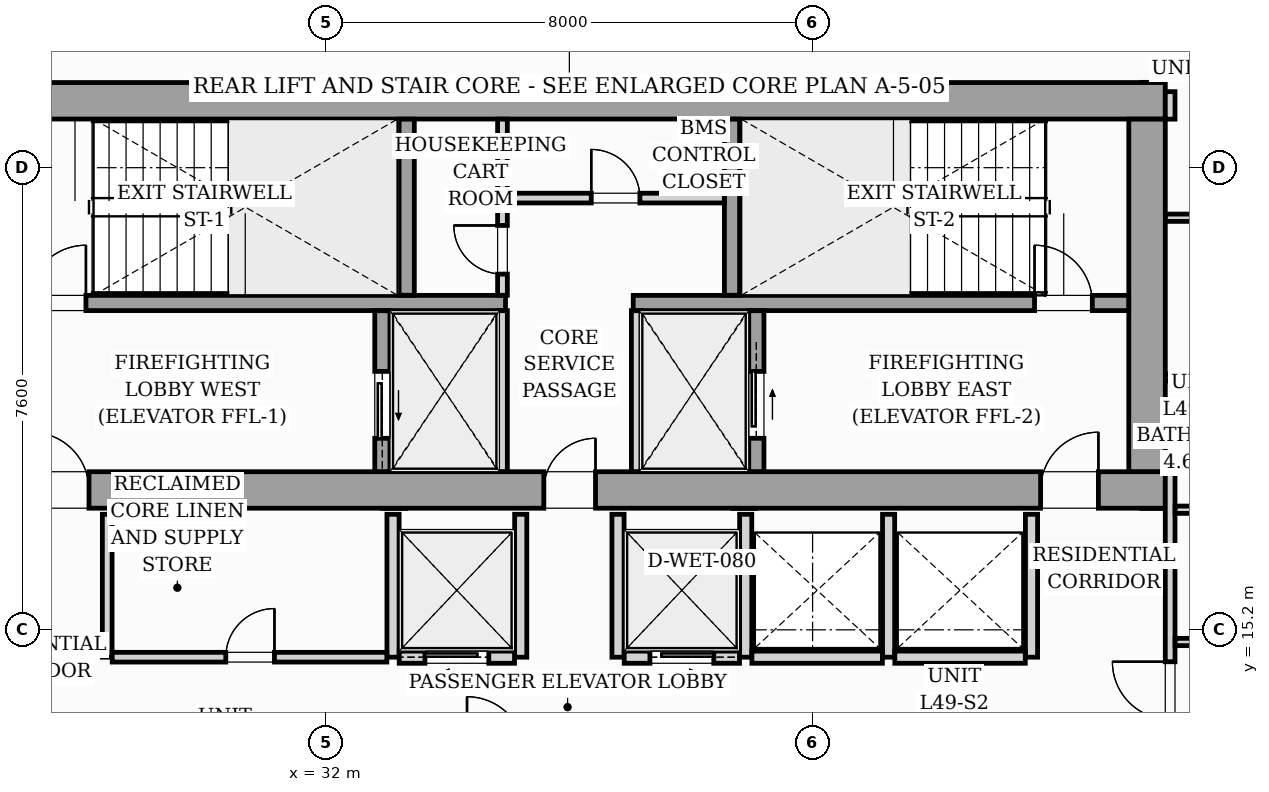
"""IFC4 building model, lengths in metres.
Left out: names, types, materials, properties, quantities, classifications, styles, units other than length and angle.
Written with IfcOpenShell. Run it as: python <this file> out.ifc"""

import sys

from ifc_helpers import new_model, si_unit, direction, frame, frame_2d, origin, origin_2d, place, context, subcontext, project, spatial, rectangle, i_section, extrude, source, transform, mapped, element, fill, save


model = new_model("IFC4")
c1 = context("Model", 3, precision=1e-05, world=origin(), true_north=direction((0.0, 1.0)))
c2 = subcontext(c1, "Body", "Model", "MODEL_VIEW")
j1 = project(units=[si_unit("LENGTHUNIT", "METRE"), si_unit("PLANEANGLEUNIT", "RADIAN")], contexts=[c1])
p1 = place(None, origin())
s1 = spatial("IfcSite", under=j1, at=p1, CompositionType="ELEMENT")
p2 = place(p1, origin())
s2 = spatial("IfcBuilding", under=s1, at=p2, CompositionType="ELEMENT")
p3 = place(p2, frame((0.0, 0.0, 173.0)))
s3 = spatial("IfcBuildingStorey", under=s2, at=p3, CompositionType="ELEMENT", Elevation=173.0)
m1 = source(origin(), c2, "Body", "SweptSolid", [
    extrude(i_section(OverallWidth=0.416, OverallDepth=0.446, WebThickness=0.039, FlangeThickness=0.063, FilletRadius=0.018, at=origin_2d()), origin(), (0.0, 0.0, 1.0), 3.196),
])
for number, where, z_axis, x_axis in (
    (1, (33.12, 17.4, 0.002), (0.0, 0.0, 1.0), (1.0, 0.0, 0.0)),
    (2, (38.88, 17.4, 0.002), (0.0, 0.0, 1.0), (1.0, 0.0, 0.0)),
    (3, (45.6, 17.4, 0.002), (0.0, 0.0, 1.0), (1.0, 0.0, 0.0)),
    (4, (33.12, 24.0, 0.002), (0.0, 0.0, 1.0), (1.0, 0.0, 0.0)),
    (5, (38.88, 24.0, 0.002), (0.0, 0.0, 1.0), (1.0, 0.0, 0.0)),
    (6, (45.6, 24.0, 0.002), (0.0, 0.0, 1.0), (1.0, 0.0, 0.0)),
):
    element("IfcColumn", number, at=place(p3, frame(where, z_axis=z_axis, x_axis=x_axis)), inside=s3, PredefinedType="PILASTER", context=c2, shape_type="MappedRepresentation", body=[
        mapped(m1, transform((0.0, 0.0, 0.0), scale=1.0)),
    ])
p4 = place(p3, frame((15.437, 24.324, 0.0), z_axis=(0.0, 0.0, 1.0), x_axis=(0.995395627913, 0.095851676732, 0.0)))
e7 = element("IfcWall", 7, at=p4, inside=s3, PredefinedType="STANDARD", context=c2, shape_type="SweptSolid", body=[
    extrude(rectangle(XDim=16.1, YDim=0.26, at=frame_2d((8.05, 0.0))), origin(), (0.0, 0.0, 1.0), 2.94),
])
p5 = place(p4, frame((7.492, 0.0, 0.0)))
e8 = element("IfcOpeningElement", 8, at=p5, cuts=e7, PredefinedType="OPENING", context=c2, shape_type="SweptSolid", body=[
    extrude(rectangle(XDim=1.8, YDim=2.06, at=frame_2d((0.9, 1.03))), frame((0.0, 0.14, 0.0), z_axis=(0.0, -1.0, 0.0), x_axis=(1.0, 0.0, 0.0)), (0.0, 0.0, 1.0), 0.28),
])
p6 = place(p4, frame((2.05, 0.0, 0.65)))
e9 = element("IfcOpeningElement", 9, at=p6, cuts=e7, PredefinedType="OPENING", context=c2, shape_type="SweptSolid", body=[
    extrude(rectangle(XDim=1.6, YDim=1.5, at=frame_2d((0.8, 0.75))), frame((0.0, 0.14, 0.0), z_axis=(0.0, -1.0, 0.0), x_axis=(1.0, 0.0, 0.0)), (0.0, 0.0, 1.0), 0.28),
])
p7 = place(p3, frame((26.2, 17.5, 0.0), z_axis=(0.0, 0.0, 1.0), x_axis=(1.0, 0.0, 0.0)))
e10 = element("IfcWall", 10, at=p7, inside=s3, PredefinedType="SHEAR", context=c2, shape_type="SweptSolid", body=[
    extrude(rectangle(XDim=19.6, YDim=0.6, at=frame_2d((9.8, 0.0))), origin(), (0.0, 0.0, 1.0), 3.2),
])
p8 = place(p7, frame((0.95, 0.0, 0.0)))
e11 = element("IfcOpeningElement", 11, at=p8, cuts=e10, PredefinedType="OPENING", context=c2, shape_type="SweptSolid", body=[
    extrude(rectangle(XDim=0.95, YDim=2.06, at=frame_2d((0.475, 1.03))), frame((0.0, 0.31, 0.0), z_axis=(0.0, -1.0, 0.0), x_axis=(1.0, 0.0, 0.0)), (0.0, 0.0, 1.0), 0.62),
])
p9 = place(p7, frame((9.38, 0.0, 0.0)))
e12 = element("IfcOpeningElement", 12, at=p9, cuts=e10, PredefinedType="OPENING", context=c2, shape_type="SweptSolid", body=[
    extrude(rectangle(XDim=0.85, YDim=2.0, at=frame_2d((0.425, 1.0))), frame((0.0, 0.31, 0.0), z_axis=(0.0, -1.0, 0.0), x_axis=(1.0, 0.0, 0.0)), (0.0, 0.0, 1.0), 0.62),
])
p10 = place(p7, frame((17.55, 0.0, 0.0)))
e13 = element("IfcOpeningElement", 13, at=p10, cuts=e10, PredefinedType="OPENING", context=c2, shape_type="SweptSolid", body=[
    extrude(rectangle(XDim=0.95, YDim=2.06, at=frame_2d((0.475, 1.03))), frame((0.0, 0.31, 0.0), z_axis=(0.0, -1.0, 0.0), x_axis=(1.0, 0.0, 0.0)), (0.0, 0.0, 1.0), 0.62),
])
p11 = place(p3, frame((26.2, 23.9, 0.0), z_axis=(0.0, 0.0, 1.0), x_axis=(1.0, 0.0, 0.0)))
e14 = element("IfcWall", 14, at=p11, inside=s3, PredefinedType="SHEAR", context=c2, shape_type="SweptSolid", body=[
    extrude(rectangle(XDim=19.6, YDim=0.6, at=frame_2d((9.8, 0.0))), origin(), (0.0, 0.0, 1.0), 3.2),
])
p12 = place(p3, frame((45.5, 17.802, 0.0), z_axis=(0.0, 0.0, 1.0), x_axis=(0.0, 1.0, 0.0)))
e15 = element("IfcWall", 15, at=p12, inside=s3, PredefinedType="SHEAR", context=c2, shape_type="SweptSolid", body=[
    extrude(rectangle(XDim=5.796, YDim=0.6, at=frame_2d((2.898, 0.0))), origin(), (0.0, 0.0, 1.0), 3.2),
])
p13 = place(p3, frame((26.802, 20.575, 0.0), z_axis=(0.0, 0.0, 1.0), x_axis=(1.0, 0.0, 0.0)))
e16 = element("IfcWall", 16, at=p13, inside=s3, PredefinedType="SOLIDWALL", context=c2, shape_type="SweptSolid", body=[
    extrude(rectangle(XDim=8.148, YDim=0.25, at=frame_2d((4.074, 0.0))), origin(), (0.0, 0.0, 1.0), 3.2),
])
p14 = place(p13, frame((0.298, 0.0, 0.0)))
e17 = element("IfcOpeningElement", 17, at=p14, cuts=e16, PredefinedType="OPENING", context=c2, shape_type="SweptSolid", body=[
    extrude(rectangle(XDim=0.95, YDim=2.06, at=frame_2d((0.475, 1.03))), frame((0.0, 0.135, 0.0), z_axis=(0.0, -1.0, 0.0), x_axis=(1.0, 0.0, 0.0)), (0.0, 0.0, 1.0), 0.27),
])
p15 = place(p3, frame((37.05, 20.575, 0.0), z_axis=(0.0, 0.0, 1.0), x_axis=(1.0, 0.0, 0.0)))
e18 = element("IfcWall", 18, at=p15, inside=s3, PredefinedType="SOLIDWALL", context=c2, shape_type="SweptSolid", body=[
    extrude(rectangle(XDim=8.148, YDim=0.25, at=frame_2d((4.074, 0.0))), origin(), (0.0, 0.0, 1.0), 3.2),
])
p16 = place(p15, frame((6.6, 0.0, 0.0)))
e19 = element("IfcOpeningElement", 19, at=p16, cuts=e18, PredefinedType="OPENING", context=c2, shape_type="SweptSolid", body=[
    extrude(rectangle(XDim=0.95, YDim=2.06, at=frame_2d((0.475, 1.03))), frame((0.0, 0.135, 0.0), z_axis=(0.0, -1.0, 0.0), x_axis=(1.0, 0.0, 0.0)), (0.0, 0.0, 1.0), 0.27),
])
for number, where, z_axis, x_axis in (
    (20, (33.325, 20.702, 0.0), (0.0, 0.0, 1.0), (0.0, 1.0, 0.0)),
    (21, (38.675, 20.702, 0.0), (0.0, 0.0, 1.0), (0.0, 1.0, 0.0)),
):
    element("IfcWall", number, at=place(p3, frame(where, z_axis=z_axis, x_axis=x_axis)), inside=s3, PredefinedType="SOLIDWALL", context=c2, shape_type="SweptSolid", body=[
        extrude(rectangle(XDim=2.896, YDim=0.25, at=frame_2d((1.448, 0.0))), origin(), (0.0, 0.0, 1.0), 3.2),
    ])
p17 = place(p3, frame((32.925, 17.802, 0.0), z_axis=(0.0, 0.0, 1.0), x_axis=(0.0, 1.0, 0.0)))
e22 = element("IfcWall", 22, at=p17, inside=s3, PredefinedType="SOLIDWALL", context=c2, shape_type="SweptSolid", body=[
    extrude(rectangle(XDim=2.646, YDim=0.25, at=frame_2d((1.323, 0.0))), origin(), (0.0, 0.0, 1.0), 3.2),
])
p18 = place(p17, frame((0.548, 0.0, 0.0)))
e23 = element("IfcOpeningElement", 23, at=p18, cuts=e22, PredefinedType="OPENING", context=c2, shape_type="SweptSolid", body=[
    extrude(rectangle(XDim=1.1, YDim=2.08, at=frame_2d((0.55, 1.04))), frame((0.0, 0.135, 0.0), z_axis=(0.0, -1.0, 0.0), x_axis=(1.0, 0.0, 0.0)), (0.0, 0.0, 1.0), 0.27),
])
for number, where, z_axis, x_axis in (
    (24, (34.9, 17.802, 0.0), (0.0, 0.0, 1.0), (0.0, 1.0, 0.0)),
    (25, (37.1, 17.802, 0.0), (0.0, 0.0, 1.0), (0.0, 1.0, 0.0)),
):
    element("IfcWall", number, at=place(p3, frame(where, z_axis=z_axis, x_axis=x_axis)), inside=s3, PredefinedType="PARTITIONING", context=c2, shape_type="SweptSolid", body=[
        extrude(rectangle(XDim=2.646, YDim=0.16, at=frame_2d((1.323, 0.0))), origin(), (0.0, 0.0, 1.0), 2.94),
    ])
p19 = place(p3, frame((39.075, 17.802, 0.0), z_axis=(0.0, 0.0, 1.0), x_axis=(0.0, 1.0, 0.0)))
e26 = element("IfcWall", 26, at=p19, inside=s3, PredefinedType="SOLIDWALL", context=c2, shape_type="SweptSolid", body=[
    extrude(rectangle(XDim=2.646, YDim=0.25, at=frame_2d((1.323, 0.0))), origin(), (0.0, 0.0, 1.0), 3.2),
])
p20 = place(p19, frame((0.548, 0.0, 0.0)))
e27 = element("IfcOpeningElement", 27, at=p20, cuts=e26, PredefinedType="OPENING", context=c2, shape_type="SweptSolid", body=[
    extrude(rectangle(XDim=1.1, YDim=2.08, at=frame_2d((0.55, 1.04))), frame((0.0, 0.135, 0.0), z_axis=(0.0, -1.0, 0.0), x_axis=(1.0, 0.0, 0.0)), (0.0, 0.0, 1.0), 0.27),
])
p21 = place(p3, frame((34.9, 20.702, 0.0), z_axis=(0.0, 0.0, 1.0), x_axis=(0.0, 1.0, 0.0)))
e28 = element("IfcWall", 28, at=p21, inside=s3, PredefinedType="PARTITIONING", context=c2, shape_type="SweptSolid", body=[
    extrude(rectangle(XDim=2.896, YDim=0.16, at=frame_2d((1.448, 0.0))), origin(), (0.0, 0.0, 1.0), 2.94),
])
p22 = place(p21, frame((0.348, 0.0, 0.0)))
e29 = element("IfcOpeningElement", 29, at=p22, cuts=e28, PredefinedType="OPENING", context=c2, shape_type="SweptSolid", body=[
    extrude(rectangle(XDim=0.8, YDim=2.05, at=frame_2d((0.4, 1.025))), frame((0.0, 0.09, 0.0), z_axis=(0.0, -1.0, 0.0), x_axis=(1.0, 0.0, 0.0)), (0.0, 0.0, 1.0), 0.18),
])
p23 = place(p3, frame((34.982, 22.3, 0.0), z_axis=(0.0, 0.0, 1.0), x_axis=(1.0, 0.0, 0.0)))
e30 = element("IfcWall", 30, at=p23, inside=s3, PredefinedType="PARTITIONING", context=c2, shape_type="SweptSolid", body=[
    extrude(rectangle(XDim=3.566, YDim=0.16, at=frame_2d((1.783, 0.0))), origin(), (0.0, 0.0, 1.0), 2.94),
])
p24 = place(p23, frame((1.378, 0.0, 0.0)))
e31 = element("IfcOpeningElement", 31, at=p24, cuts=e30, PredefinedType="OPENING", context=c2, shape_type="SweptSolid", body=[
    extrude(rectangle(XDim=0.8, YDim=2.05, at=frame_2d((0.4, 1.025))), frame((0.0, 0.09, 0.0), z_axis=(0.0, -1.0, 0.0), x_axis=(1.0, 0.0, 0.0)), (0.0, 0.0, 1.0), 0.18),
])
p25 = place(p3, frame((28.4, 14.75, 0.0), z_axis=(0.0, 0.0, 1.0), x_axis=(0.0, 1.0, 0.0)))
e32 = element("IfcWall", 32, at=p25, inside=s3, PredefinedType="PARTITIONING", context=c2, shape_type="SweptSolid", body=[
    extrude(rectangle(XDim=2.35, YDim=0.16, at=frame_2d((1.175, 0.0))), origin(), (0.0, 0.0, 1.0), 2.94),
])
p26 = place(p3, frame((33.1, 14.75, 0.0), z_axis=(0.0, 0.0, 1.0), x_axis=(0.0, 1.0, 0.0)))
e33 = element("IfcWall", 33, at=p26, inside=s3, PredefinedType="PARTITIONING", context=c2, shape_type="SweptSolid", body=[
    extrude(rectangle(XDim=2.35, YDim=0.2, at=frame_2d((1.175, 0.0))), origin(), (0.0, 0.0, 1.0), 2.94),
])
p27 = place(p3, frame((28.482, 14.75, 0.0), z_axis=(0.0, 0.0, 1.0), x_axis=(1.0, 0.0, 0.0)))
e34 = element("IfcWall", 34, at=p27, inside=s3, PredefinedType="PARTITIONING", context=c2, shape_type="SweptSolid", body=[
    extrude(rectangle(XDim=4.516, YDim=0.16, at=frame_2d((2.258, 0.0))), origin(), (0.0, 0.0, 1.0), 2.94),
])
p28 = place(p27, frame((1.868, 0.0, 0.0)))
e35 = element("IfcOpeningElement", 35, at=p28, cuts=e34, PredefinedType="OPENING", context=c2, shape_type="SweptSolid", body=[
    extrude(rectangle(XDim=0.8, YDim=2.05, at=frame_2d((0.4, 1.025))), frame((0.0, 0.09, 0.0), z_axis=(0.0, -1.0, 0.0), x_axis=(1.0, 0.0, 0.0)), (0.0, 0.0, 1.0), 0.18),
])
p29 = place(p3, frame((35.2, 14.75, 0.0), z_axis=(0.0, 0.0, 1.0), x_axis=(0.0, 1.0, 0.0)))
e36 = element("IfcWall", 36, at=p29, inside=s3, PredefinedType="PARTITIONING", context=c2, shape_type="SweptSolid", body=[
    extrude(rectangle(XDim=2.35, YDim=0.2, at=frame_2d((1.175, 0.0))), origin(), (0.0, 0.0, 1.0), 2.94),
])
p30 = place(p3, frame((33.202, 14.75, 0.0), z_axis=(0.0, 0.0, 1.0), x_axis=(1.0, 0.0, 0.0)))
e37 = element("IfcWall", 37, at=p30, inside=s3, PredefinedType="PARTITIONING", context=c2, shape_type="SweptSolid", body=[
    extrude(rectangle(XDim=1.896, YDim=0.2, at=frame_2d((0.948, 0.0))), origin(), (0.0, 0.0, 1.0), 2.94),
])
p31 = place(p30, frame((0.423, 0.0, 0.0)))
e38 = element("IfcOpeningElement", 38, at=p31, cuts=e37, PredefinedType="OPENING", context=c2, shape_type="SweptSolid", body=[
    extrude(rectangle(XDim=1.05, YDim=2.08, at=frame_2d((0.525, 1.04))), frame((0.0, 0.11, 0.0), z_axis=(0.0, -1.0, 0.0), x_axis=(1.0, 0.0, 0.0)), (0.0, 0.0, 1.0), 0.22),
])
for number, where, z_axis, x_axis in (
    (39, (36.8, 14.75, 0.0), (0.0, 0.0, 1.0), (0.0, 1.0, 0.0)),
    (40, (38.9, 14.75, 0.0), (0.0, 0.0, 1.0), (0.0, 1.0, 0.0)),
):
    element("IfcWall", number, at=place(p3, frame(where, z_axis=z_axis, x_axis=x_axis)), inside=s3, PredefinedType="PARTITIONING", context=c2, shape_type="SweptSolid", body=[
        extrude(rectangle(XDim=2.35, YDim=0.2, at=frame_2d((1.175, 0.0))), origin(), (0.0, 0.0, 1.0), 2.94),
    ])
p32 = place(p3, frame((36.902, 14.75, 0.0), z_axis=(0.0, 0.0, 1.0), x_axis=(1.0, 0.0, 0.0)))
e41 = element("IfcWall", 41, at=p32, inside=s3, PredefinedType="PARTITIONING", context=c2, shape_type="SweptSolid", body=[
    extrude(rectangle(XDim=1.896, YDim=0.2, at=frame_2d((0.948, 0.0))), origin(), (0.0, 0.0, 1.0), 2.94),
])
p33 = place(p32, frame((0.423, 0.0, 0.0)))
e42 = element("IfcOpeningElement", 42, at=p33, cuts=e41, PredefinedType="OPENING", context=c2, shape_type="SweptSolid", body=[
    extrude(rectangle(XDim=1.05, YDim=2.08, at=frame_2d((0.525, 1.04))), frame((0.0, 0.11, 0.0), z_axis=(0.0, -1.0, 0.0), x_axis=(1.0, 0.0, 0.0)), (0.0, 0.0, 1.0), 0.22),
])
for number, where, z_axis, x_axis in (
    (43, (41.25, 14.75, 0.0), (0.0, 0.0, 1.0), (0.0, 1.0, 0.0)),
    (44, (43.6, 14.75, 0.0), (0.0, 0.0, 1.0), (0.0, 1.0, 0.0)),
):
    element("IfcWall", number, at=place(p3, frame(where, z_axis=z_axis, x_axis=x_axis)), inside=s3, PredefinedType="PARTITIONING", context=c2, shape_type="SweptSolid", body=[
        extrude(rectangle(XDim=2.35, YDim=0.2, at=frame_2d((1.175, 0.0))), origin(), (0.0, 0.0, 1.0), 2.94),
    ])
for number, where, z_axis, x_axis in (
    (45, (39.002, 14.75, 0.0), (0.0, 0.0, 1.0), (1.0, 0.0, 0.0)),
    (46, (41.352, 14.75, 0.0), (0.0, 0.0, 1.0), (1.0, 0.0, 0.0)),
):
    element("IfcWall", number, at=place(p3, frame(where, z_axis=z_axis, x_axis=x_axis)), inside=s3, PredefinedType="PARTITIONING", context=c2, shape_type="SweptSolid", body=[
        extrude(rectangle(XDim=2.146, YDim=0.2, at=frame_2d((1.073, 0.0))), origin(), (0.0, 0.0, 1.0), 2.94),
    ])
p34 = place(p3, frame((45.88, 13.232, 0.0), z_axis=(0.0, 0.0, 1.0), x_axis=(0.0, 1.0, 0.0)))
e47 = element("IfcWall", 47, at=p34, inside=s3, PredefinedType="PARTITIONING", context=c2, shape_type="SweptSolid", body=[
    extrude(rectangle(XDim=4.57, YDim=0.16, at=frame_2d((2.285, 0.0))), origin(), (0.0, 0.0, 1.0), 2.94),
])
p35 = place(p34, frame((0.493, 0.0, 0.0)))
e48 = element("IfcOpeningElement", 48, at=p35, cuts=e47, PredefinedType="OPENING", context=c2, shape_type="SweptSolid", body=[
    extrude(rectangle(XDim=0.95, YDim=2.06, at=frame_2d((0.475, 1.03))), frame((0.0, 0.09, 0.0), z_axis=(0.0, -1.0, 0.0), x_axis=(1.0, 0.0, 0.0)), (0.0, 0.0, 1.0), 0.18),
])
p36 = place(p3, frame((45.88, 23.598, 0.0), z_axis=(0.0, 0.0, 1.0), x_axis=(0.0, 1.0, 0.0)))
e49 = element("IfcWall", 49, at=p36, inside=s3, PredefinedType="PARTITIONING", context=c2, shape_type="SweptSolid", body=[
    extrude(rectangle(XDim=0.452, YDim=0.16, at=frame_2d((0.226, 0.0))), origin(), (0.0, 0.0, 1.0), 2.94),
])
for number, where, z_axis, x_axis in (
    (50, (45.962, 17.175, 0.0), (0.0, 0.0, 1.0), (1.0, 0.0, 0.0)),
    (51, (45.962, 15.0, 0.0), (0.0, 0.0, 1.0), (1.0, 0.0, 0.0)),
):
    element("IfcWall", number, at=place(p3, frame(where, z_axis=z_axis, x_axis=x_axis)), inside=s3, PredefinedType="PARTITIONING", context=c2, shape_type="SweptSolid", body=[
        extrude(rectangle(XDim=2.256, YDim=0.12, at=frame_2d((1.128, 0.0))), origin(), (0.0, 0.0, 1.0), 2.94),
    ])
p37 = place(p3, frame((45.802, 19.35, 0.0), z_axis=(0.0, 0.0, 1.0), x_axis=(1.0, 0.0, 0.0)))
e52 = element("IfcWall", 52, at=p37, inside=s3, PredefinedType="PARTITIONING", context=c2, shape_type="SweptSolid", body=[
    extrude(rectangle(XDim=2.416, YDim=0.12, at=frame_2d((1.208, 0.0))), origin(), (0.0, 0.0, 1.0), 2.94),
])
p38 = place(p3, frame((45.802, 21.977, 0.0), z_axis=(0.0, 0.0, 1.0), x_axis=(1.0, 0.0, 0.0)))
e53 = element("IfcWall", 53, at=p38, inside=s3, PredefinedType="PARTITIONING", context=c2, shape_type="SweptSolid", body=[
    extrude(rectangle(XDim=18.504, YDim=0.12, at=frame_2d((9.252, 0.0))), origin(), (0.0, 0.0, 1.0), 2.94),
])
p39 = place(p38, frame((8.913, 0.0, 0.0)))
e54 = element("IfcOpeningElement", 54, at=p39, cuts=e53, PredefinedType="OPENING", context=c2, shape_type="SweptSolid", body=[
    extrude(rectangle(XDim=0.85, YDim=2.05, at=frame_2d((0.425, 1.025))), frame((0.0, 0.07, 0.0), z_axis=(0.0, -1.0, 0.0), x_axis=(1.0, 0.0, 0.0)), (0.0, 0.0, 1.0), 0.14),
])
m2 = source(origin(), c2, "Body", "SweptSolid", [
    extrude(rectangle(XDim=0.95, YDim=2.06, at=frame_2d((0.475, 1.03))), frame((0.0, 0.025, 0.0), z_axis=(0.0, -1.0, 0.0), x_axis=(1.0, 0.0, 0.0)), (0.0, 0.0, 1.0), 0.05),
])
p40 = place(p8, origin())
e55 = element("IfcDoor", 55, at=p40, inside=s3, OperationType="SINGLE_SWING_LEFT", PredefinedType="DOOR", context=c2, shape_type="MappedRepresentation", body=[
    mapped(m2, transform((0.0, 0.0, 0.0), scale=1.0)),
])
fill(e11, e55)
m3 = source(origin(), c2, "Body", "SweptSolid", [
    extrude(rectangle(XDim=0.85, YDim=2.0, at=frame_2d((0.425, 1.0))), frame((0.0, 0.025, 0.0), z_axis=(0.0, -1.0, 0.0), x_axis=(1.0, 0.0, 0.0)), (0.0, 0.0, 1.0), 0.05),
])
p41 = place(p9, origin())
e56 = element("IfcDoor", 56, at=p41, inside=s3, OperationType="SINGLE_SWING_RIGHT", PredefinedType="DOOR", context=c2, shape_type="MappedRepresentation", body=[
    mapped(m3, transform((0.0, 0.0, 0.0), scale=1.0)),
])
fill(e12, e56)
p42 = place(p10, origin())
e57 = element("IfcDoor", 57, at=p42, inside=s3, OperationType="SINGLE_SWING_RIGHT", PredefinedType="DOOR", context=c2, shape_type="MappedRepresentation", body=[
    mapped(m2, transform((0.0, 0.0, 0.0), scale=1.0)),
])
fill(e13, e57)
p43 = place(p14, origin())
e58 = element("IfcDoor", 58, at=p43, inside=s3, OperationType="SINGLE_SWING_RIGHT", PredefinedType="DOOR", context=c2, shape_type="MappedRepresentation", body=[
    mapped(m2, transform((0.0, 0.0, 0.0), scale=1.0)),
])
fill(e17, e58)
p44 = place(p16, origin())
e59 = element("IfcDoor", 59, at=p44, inside=s3, OperationType="SINGLE_SWING_LEFT", PredefinedType="DOOR", context=c2, shape_type="MappedRepresentation", body=[
    mapped(m2, transform((0.0, 0.0, 0.0), scale=1.0)),
])
fill(e19, e59)
m4 = source(origin(), c2, "Body", "SweptSolid", [
    extrude(rectangle(XDim=1.1, YDim=2.08, at=frame_2d((0.55, 1.04))), frame((0.0, 0.025, 0.0), z_axis=(0.0, -1.0, 0.0), x_axis=(1.0, 0.0, 0.0)), (0.0, 0.0, 1.0), 0.05),
])
p45 = place(p18, origin())
e60 = element("IfcDoor", 60, at=p45, inside=s3, OperationType="SLIDING_TO_LEFT", PredefinedType="DOOR", context=c2, shape_type="MappedRepresentation", body=[
    mapped(m4, transform((0.0, 0.0, 0.0), scale=1.0)),
])
fill(e23, e60)
p46 = place(p20, origin())
e61 = element("IfcDoor", 61, at=p46, inside=s3, OperationType="SLIDING_TO_RIGHT", PredefinedType="DOOR", context=c2, shape_type="MappedRepresentation", body=[
    mapped(m4, transform((0.0, 0.0, 0.0), scale=1.0)),
])
fill(e27, e61)
m5 = source(origin(), c2, "Body", "SweptSolid", [
    extrude(rectangle(XDim=0.8, YDim=2.05, at=frame_2d((0.4, 1.025))), frame((0.0, 0.025, 0.0), z_axis=(0.0, -1.0, 0.0), x_axis=(1.0, 0.0, 0.0)), (0.0, 0.0, 1.0), 0.05),
])
p47 = place(p22, origin())
e62 = element("IfcDoor", 62, at=p47, inside=s3, OperationType="SINGLE_SWING_RIGHT", PredefinedType="DOOR", context=c2, shape_type="MappedRepresentation", body=[
    mapped(m5, transform((0.0, 0.0, 0.0), scale=1.0)),
])
fill(e29, e62)
p48 = place(p24, origin())
e63 = element("IfcDoor", 63, at=p48, inside=s3, OperationType="SINGLE_SWING_LEFT", PredefinedType="DOOR", context=c2, shape_type="MappedRepresentation", body=[
    mapped(m5, transform((0.0, 0.0, 0.0), scale=1.0)),
])
fill(e31, e63)
p49 = place(p28, origin())
e64 = element("IfcDoor", 64, at=p49, inside=s3, OperationType="SINGLE_SWING_RIGHT", PredefinedType="DOOR", context=c2, shape_type="MappedRepresentation", body=[
    mapped(m5, transform((0.0, 0.0, 0.0), scale=1.0)),
])
fill(e35, e64)
m6 = source(origin(), c2, "Body", "SweptSolid", [
    extrude(rectangle(XDim=1.05, YDim=2.08, at=frame_2d((0.525, 1.04))), frame((0.0, 0.025, 0.0), z_axis=(0.0, -1.0, 0.0), x_axis=(1.0, 0.0, 0.0)), (0.0, 0.0, 1.0), 0.05),
])
p50 = place(p31, origin())
e65 = element("IfcDoor", 65, at=p50, inside=s3, OperationType="SLIDING_TO_LEFT", PredefinedType="DOOR", context=c2, shape_type="MappedRepresentation", body=[
    mapped(m6, transform((0.0, 0.0, 0.0), scale=1.0)),
])
fill(e38, e65)
p51 = place(p33, origin())
e66 = element("IfcDoor", 66, at=p51, inside=s3, OperationType="SLIDING_TO_RIGHT", PredefinedType="DOOR", context=c2, shape_type="MappedRepresentation", body=[
    mapped(m6, transform((0.0, 0.0, 0.0), scale=1.0)),
])
fill(e42, e66)
m7 = source(origin(), c2, "Body", "SweptSolid", [
    extrude(rectangle(XDim=0.95, YDim=2.06, at=frame_2d((0.475, 1.03))), frame((0.0, 0.025, 0.0), z_axis=(0.0, -1.0, 0.0), x_axis=(1.0, 0.0, 0.0)), (0.0, 0.0, 1.0), 0.05),
])
p52 = place(p35, origin())
e67 = element("IfcDoor", 67, at=p52, inside=s3, OperationType="SINGLE_SWING_RIGHT", PredefinedType="DOOR", context=c2, shape_type="MappedRepresentation", body=[
    mapped(m7, transform((0.0, 0.0, 0.0), scale=1.0)),
])
fill(e48, e67)
save(model, sys.argv[1])
